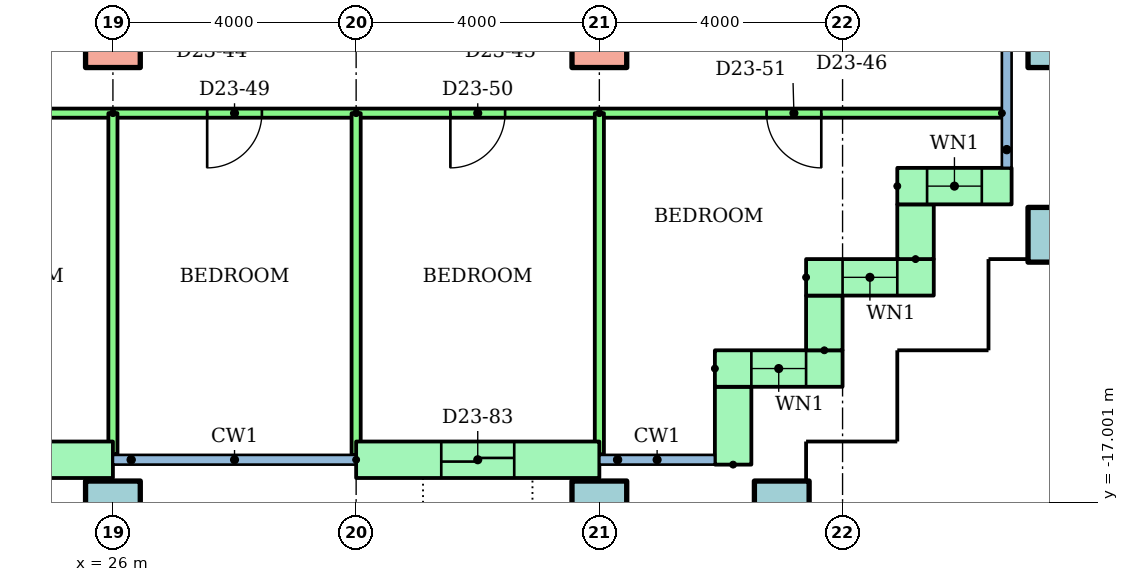
"""IFC4 building model, lengths in metres.
Left out: names, types, materials, properties, quantities, classifications, styles, units other than length and angle.
Written with IfcOpenShell. Run it as: python <this file> out.ifc"""

import sys

from ifc_helpers import new_model, si_unit, direction, frame, frame_2d, origin, origin_2d, place, context, subcontext, project, spatial, rectangle, hollow_rectangle, extrude, element, fill, save


model = new_model("IFC4")
c1 = context("Model", 3, precision=1e-05, world=origin(), true_north=direction((0.0, 1.0)))
c2 = subcontext(c1, "Body", "Model", "MODEL_VIEW")
j1 = project(units=[si_unit("LENGTHUNIT", "METRE"), si_unit("PLANEANGLEUNIT", "RADIAN")], contexts=[c1])
p1 = place(None, origin())
s1 = spatial("IfcSite", under=j1, at=p1, CompositionType="ELEMENT")
p2 = place(p1, origin())
s2 = spatial("IfcBuilding", under=s1, at=p2, CompositionType="ELEMENT")
p3 = place(p2, frame((0.0, 0.0, 90.3)))
s3 = spatial("IfcBuildingStorey", under=s2, at=p3, CompositionType="ELEMENT", Elevation=90.3)
for number, where in (
    (1, (26.0, -17.1, 0.0)),
    (2, (34.0, -17.1, 0.0)),
    (3, (37.0, -17.1, 0.0)),
    (4, (41.5, -12.6, 0.0)),
):
    element("IfcColumn", number, at=place(p3, frame(where)), inside=s3, PredefinedType="COLUMN", context=c2, shape_type="SweptSolid", body=[
        extrude(hollow_rectangle(XDim=0.9, YDim=0.9, WallThickness=0.045, at=origin_2d()), origin(), (0.0, 0.0, 1.0), 3.2),
    ])
for number, where in (
    (5, (26.0, -9.4, 0.0)),
    (6, (34.0, -9.4, 0.0)),
):
    element("IfcColumn", number, at=place(p3, frame(where)), inside=s3, PredefinedType="COLUMN", context=c2, shape_type="SweptSolid", body=[
        extrude(rectangle(XDim=0.9, YDim=0.9, at=origin_2d()), origin(), (0.0, 0.0, 1.0), 3.2),
    ])
p4 = place(p3, frame((41.5, -9.4, 0.0)))
e7 = element("IfcColumn", 7, at=p4, inside=s3, PredefinedType="COLUMN", context=c2, shape_type="SweptSolid", body=[
    extrude(hollow_rectangle(XDim=0.9, YDim=0.9, WallThickness=0.045, at=origin_2d()), origin(), (0.0, 0.0, 1.0), 3.2),
])
p5 = place(p3, frame((22.0, -16.3, 0.0)))
e8 = element("IfcWall", 8, at=p5, inside=s3, PredefinedType="STANDARD", context=c2, shape_type="SweptSolid", body=[
    extrude(rectangle(XDim=4.0, YDim=0.6, at=frame_2d((2.0, 0.0))), origin(), (0.0, 0.0, 1.0), 2.92),
])
p6 = place(p5, frame((1.4, 0.0, 0.0)))
e9 = element("IfcOpeningElement", 9, at=p6, cuts=e8, PredefinedType="OPENING", context=c2, shape_type="SweptSolid", body=[
    extrude(rectangle(XDim=1.2, YDim=2.1, at=frame_2d((0.6, 1.05))), frame((0.0, 0.31, 0.0), z_axis=(0.0, -1.0, 0.0), x_axis=(1.0, 0.0, 0.0)), (0.0, 0.0, 1.0), 0.62),
])
p7 = place(p3, frame((30.0, -16.3, 0.0)))
e10 = element("IfcWall", 10, at=p7, inside=s3, PredefinedType="STANDARD", context=c2, shape_type="SweptSolid", body=[
    extrude(rectangle(XDim=4.0, YDim=0.6, at=frame_2d((2.0, 0.0))), origin(), (0.0, 0.0, 1.0), 2.92),
])
p8 = place(p7, frame((1.4, 0.0, 0.0)))
e11 = element("IfcOpeningElement", 11, at=p8, cuts=e10, PredefinedType="OPENING", context=c2, shape_type="SweptSolid", body=[
    extrude(rectangle(XDim=1.2, YDim=2.1, at=frame_2d((0.6, 1.05))), frame((0.0, 0.31, 0.0), z_axis=(0.0, -1.0, 0.0), x_axis=(1.0, 0.0, 0.0)), (0.0, 0.0, 1.0), 0.62),
])
p9 = place(p3, frame((36.2, -16.38, 0.0), z_axis=(0.0, 0.0, 1.0), x_axis=(0.0, 1.0, 0.0)))
e12 = element("IfcWall", 12, at=p9, inside=s3, PredefinedType="STANDARD", context=c2, shape_type="SweptSolid", body=[
    extrude(rectangle(XDim=1.28, YDim=0.6, at=frame_2d((0.64, 0.0))), origin(), (0.0, 0.0, 1.0), 2.92),
])
p10 = place(p3, frame((35.9, -14.8, 0.0)))
e13 = element("IfcWall", 13, at=p10, inside=s3, PredefinedType="STANDARD", context=c2, shape_type="SweptSolid", body=[
    extrude(rectangle(XDim=2.1, YDim=0.6, at=frame_2d((1.05, 0.0))), origin(), (0.0, 0.0, 1.0), 2.92),
])
p11 = place(p10, frame((0.6, 0.0, 0.9)))
e14 = element("IfcOpeningElement", 14, at=p11, cuts=e13, PredefinedType="OPENING", context=c2, shape_type="SweptSolid", body=[
    extrude(rectangle(XDim=0.9, YDim=1.5, at=frame_2d((0.45, 0.75))), frame((0.0, 0.31, 0.0), z_axis=(0.0, -1.0, 0.0), x_axis=(1.0, 0.0, 0.0)), (0.0, 0.0, 1.0), 0.62),
])
p12 = place(p3, frame((37.7, -14.5, 0.0), z_axis=(0.0, 0.0, 1.0), x_axis=(0.0, 1.0, 0.0)))
e15 = element("IfcWall", 15, at=p12, inside=s3, PredefinedType="STANDARD", context=c2, shape_type="SweptSolid", body=[
    extrude(rectangle(XDim=0.9, YDim=0.6, at=frame_2d((0.45, 0.0))), origin(), (0.0, 0.0, 1.0), 2.92),
])
p13 = place(p3, frame((37.4, -13.3, 0.0)))
e16 = element("IfcWall", 16, at=p13, inside=s3, PredefinedType="STANDARD", context=c2, shape_type="SweptSolid", body=[
    extrude(rectangle(XDim=2.1, YDim=0.6, at=frame_2d((1.05, 0.0))), origin(), (0.0, 0.0, 1.0), 2.92),
])
p14 = place(p13, frame((0.6, 0.0, 0.9)))
e17 = element("IfcOpeningElement", 17, at=p14, cuts=e16, PredefinedType="OPENING", context=c2, shape_type="SweptSolid", body=[
    extrude(rectangle(XDim=0.9, YDim=1.5, at=frame_2d((0.45, 0.75))), frame((0.0, 0.31, 0.0), z_axis=(0.0, -1.0, 0.0), x_axis=(1.0, 0.0, 0.0)), (0.0, 0.0, 1.0), 0.62),
])
p15 = place(p3, frame((39.2, -13.0, 0.0), z_axis=(0.0, 0.0, 1.0), x_axis=(0.0, 1.0, 0.0)))
e18 = element("IfcWall", 18, at=p15, inside=s3, PredefinedType="STANDARD", context=c2, shape_type="SweptSolid", body=[
    extrude(rectangle(XDim=0.9, YDim=0.6, at=frame_2d((0.45, 0.0))), origin(), (0.0, 0.0, 1.0), 2.92),
])
p16 = place(p3, frame((38.9, -11.8, 0.0)))
e19 = element("IfcWall", 19, at=p16, inside=s3, PredefinedType="STANDARD", context=c2, shape_type="SweptSolid", body=[
    extrude(rectangle(XDim=1.88, YDim=0.6, at=frame_2d((0.94, 0.0))), origin(), (0.0, 0.0, 1.0), 2.92),
])
p17 = place(p16, frame((0.49, 0.0, 0.9)))
e20 = element("IfcOpeningElement", 20, at=p17, cuts=e19, PredefinedType="OPENING", context=c2, shape_type="SweptSolid", body=[
    extrude(rectangle(XDim=0.9, YDim=1.5, at=frame_2d((0.45, 0.75))), frame((0.0, 0.31, 0.0), z_axis=(0.0, -1.0, 0.0), x_axis=(1.0, 0.0, 0.0)), (0.0, 0.0, 1.0), 0.62),
])
p18 = place(p3, frame((40.62, -10.6, 0.0), z_axis=(0.0, 0.0, 1.0), x_axis=(-1.0, 0.0, 0.0)))
e21 = element("IfcWall", 21, at=p18, inside=s3, PredefinedType="PARTITIONING", context=c2, shape_type="SweptSolid", body=[
    extrude(rectangle(XDim=22.62, YDim=0.15, at=frame_2d((11.31, 0.0))), origin(), (0.0, 0.0, 1.0), 2.4),
])
p19 = place(p18, frame((20.17, 0.0, 0.0)))
e22 = element("IfcOpeningElement", 22, at=p19, cuts=e21, PredefinedType="OPENING", context=c2, shape_type="SweptSolid", body=[
    extrude(rectangle(XDim=0.9, YDim=2.1, at=frame_2d((0.45, 1.05))), frame((0.0, 0.085, 0.0), z_axis=(0.0, -1.0, 0.0), x_axis=(1.0, 0.0, 0.0)), (0.0, 0.0, 1.0), 0.17),
])
p20 = place(p18, frame((16.12, 0.0, 0.0)))
e23 = element("IfcOpeningElement", 23, at=p20, cuts=e21, PredefinedType="OPENING", context=c2, shape_type="SweptSolid", body=[
    extrude(rectangle(XDim=1.0, YDim=2.1, at=frame_2d((0.5, 1.05))), frame((0.0, 0.085, 0.0), z_axis=(0.0, -1.0, 0.0), x_axis=(1.0, 0.0, 0.0)), (0.0, 0.0, 1.0), 0.17),
])
p21 = place(p18, frame((12.17, 0.0, 0.0)))
e24 = element("IfcOpeningElement", 24, at=p21, cuts=e21, PredefinedType="OPENING", context=c2, shape_type="SweptSolid", body=[
    extrude(rectangle(XDim=0.9, YDim=2.1, at=frame_2d((0.45, 1.05))), frame((0.0, 0.085, 0.0), z_axis=(0.0, -1.0, 0.0), x_axis=(1.0, 0.0, 0.0)), (0.0, 0.0, 1.0), 0.17),
])
p22 = place(p18, frame((8.17, 0.0, 0.0)))
e25 = element("IfcOpeningElement", 25, at=p22, cuts=e21, PredefinedType="OPENING", context=c2, shape_type="SweptSolid", body=[
    extrude(rectangle(XDim=0.9, YDim=2.1, at=frame_2d((0.45, 1.05))), frame((0.0, 0.085, 0.0), z_axis=(0.0, -1.0, 0.0), x_axis=(1.0, 0.0, 0.0)), (0.0, 0.0, 1.0), 0.17),
])
p23 = place(p18, frame((2.97, 0.0, 0.0)))
e26 = element("IfcOpeningElement", 26, at=p23, cuts=e21, PredefinedType="OPENING", context=c2, shape_type="SweptSolid", body=[
    extrude(rectangle(XDim=0.9, YDim=2.1, at=frame_2d((0.45, 1.05))), frame((0.0, 0.085, 0.0), z_axis=(0.0, -1.0, 0.0), x_axis=(1.0, 0.0, 0.0)), (0.0, 0.0, 1.0), 0.17),
])
p24 = place(p3, frame((26.0, -10.6, 0.0), z_axis=(0.0, 0.0, 1.0), x_axis=(0.0, -1.0, 0.0)))
e27 = element("IfcWall", 27, at=p24, inside=s3, PredefinedType="PARTITIONING", context=c2, shape_type="SweptSolid", body=[
    extrude(rectangle(XDim=5.61, YDim=0.15, at=frame_2d((2.805, 0.0))), origin(), (0.0, 0.0, 1.0), 2.4),
])
p25 = place(p3, frame((30.0, -10.6, 0.0), z_axis=(0.0, 0.0, 1.0), x_axis=(0.0, -1.0, 0.0)))
e28 = element("IfcWall", 28, at=p25, inside=s3, PredefinedType="PARTITIONING", context=c2, shape_type="SweptSolid", body=[
    extrude(rectangle(XDim=5.621, YDim=0.15, at=frame_2d((2.811, 0.0))), origin(), (0.0, 0.0, 1.0), 2.4),
])
p26 = place(p3, frame((34.0, -10.6, 0.0), z_axis=(0.0, 0.0, 1.0), x_axis=(0.0, -1.0, 0.0)))
e29 = element("IfcWall", 29, at=p26, inside=s3, PredefinedType="PARTITIONING", context=c2, shape_type="SweptSolid", body=[
    extrude(rectangle(XDim=5.61, YDim=0.15, at=frame_2d((2.805, 0.0))), origin(), (0.0, 0.0, 1.0), 2.4),
])
p27 = place(p11, origin())
e30 = element("IfcWindow", 30, at=p27, inside=s3, PartitioningType="SINGLE_PANEL", PredefinedType="WINDOW", context=c2, shape_type="SweptSolid", body=[
    extrude(rectangle(XDim=0.9, YDim=1.5, at=frame_2d((0.45, 0.75))), frame((0.0, 0.03, 0.0), z_axis=(0.0, -1.0, 0.0), x_axis=(1.0, 0.0, 0.0)), (0.0, 0.0, 1.0), 0.06),
])
fill(e14, e30)
p28 = place(p14, origin())
e31 = element("IfcWindow", 31, at=p28, inside=s3, PartitioningType="SINGLE_PANEL", PredefinedType="WINDOW", context=c2, shape_type="SweptSolid", body=[
    extrude(rectangle(XDim=0.9, YDim=1.5, at=frame_2d((0.45, 0.75))), frame((0.0, 0.03, 0.0), z_axis=(0.0, -1.0, 0.0), x_axis=(1.0, 0.0, 0.0)), (0.0, 0.0, 1.0), 0.06),
])
fill(e17, e31)
p29 = place(p17, origin())
e32 = element("IfcWindow", 32, at=p29, inside=s3, PartitioningType="SINGLE_PANEL", PredefinedType="WINDOW", context=c2, shape_type="SweptSolid", body=[
    extrude(rectangle(XDim=0.9, YDim=1.5, at=frame_2d((0.45, 0.75))), frame((0.0, 0.03, 0.0), z_axis=(0.0, -1.0, 0.0), x_axis=(1.0, 0.0, 0.0)), (0.0, 0.0, 1.0), 0.06),
])
fill(e20, e32)
p30 = place(p21, origin())
e33 = element("IfcDoor", 33, at=p30, inside=s3, OperationType="SINGLE_SWING_RIGHT", PredefinedType="DOOR", context=c2, shape_type="SweptSolid", body=[
    extrude(rectangle(XDim=0.9, YDim=2.1, at=frame_2d((0.45, 1.05))), frame((0.0, 0.025, 0.0), z_axis=(0.0, -1.0, 0.0), x_axis=(1.0, 0.0, 0.0)), (0.0, 0.0, 1.0), 0.05),
])
fill(e24, e33)
p31 = place(p22, origin())
e34 = element("IfcDoor", 34, at=p31, inside=s3, OperationType="SINGLE_SWING_RIGHT", PredefinedType="DOOR", context=c2, shape_type="SweptSolid", body=[
    extrude(rectangle(XDim=0.9, YDim=2.1, at=frame_2d((0.45, 1.05))), frame((0.0, 0.025, 0.0), z_axis=(0.0, -1.0, 0.0), x_axis=(1.0, 0.0, 0.0)), (0.0, 0.0, 1.0), 0.05),
])
fill(e25, e34)
p32 = place(p23, origin())
e35 = element("IfcDoor", 35, at=p32, inside=s3, OperationType="SINGLE_SWING_LEFT", PredefinedType="DOOR", context=c2, shape_type="SweptSolid", body=[
    extrude(rectangle(XDim=0.9, YDim=2.1, at=frame_2d((0.45, 1.05))), frame((0.0, 0.025, 0.0), z_axis=(0.0, -1.0, 0.0), x_axis=(1.0, 0.0, 0.0)), (0.0, 0.0, 1.0), 0.05),
])
fill(e26, e35)
p33 = place(p8, origin())
e36 = element("IfcDoor", 36, at=p33, inside=s3, OperationType="SLIDING_TO_LEFT", PredefinedType="DOOR", context=c2, shape_type="SweptSolid", body=[
    extrude(rectangle(XDim=1.2, YDim=2.1, at=frame_2d((0.6, 1.05))), frame((0.0, 0.025, 0.0), z_axis=(0.0, -1.0, 0.0), x_axis=(1.0, 0.0, 0.0)), (0.0, 0.0, 1.0), 0.05),
])
fill(e11, e36)
save(model, sys.argv[1])
